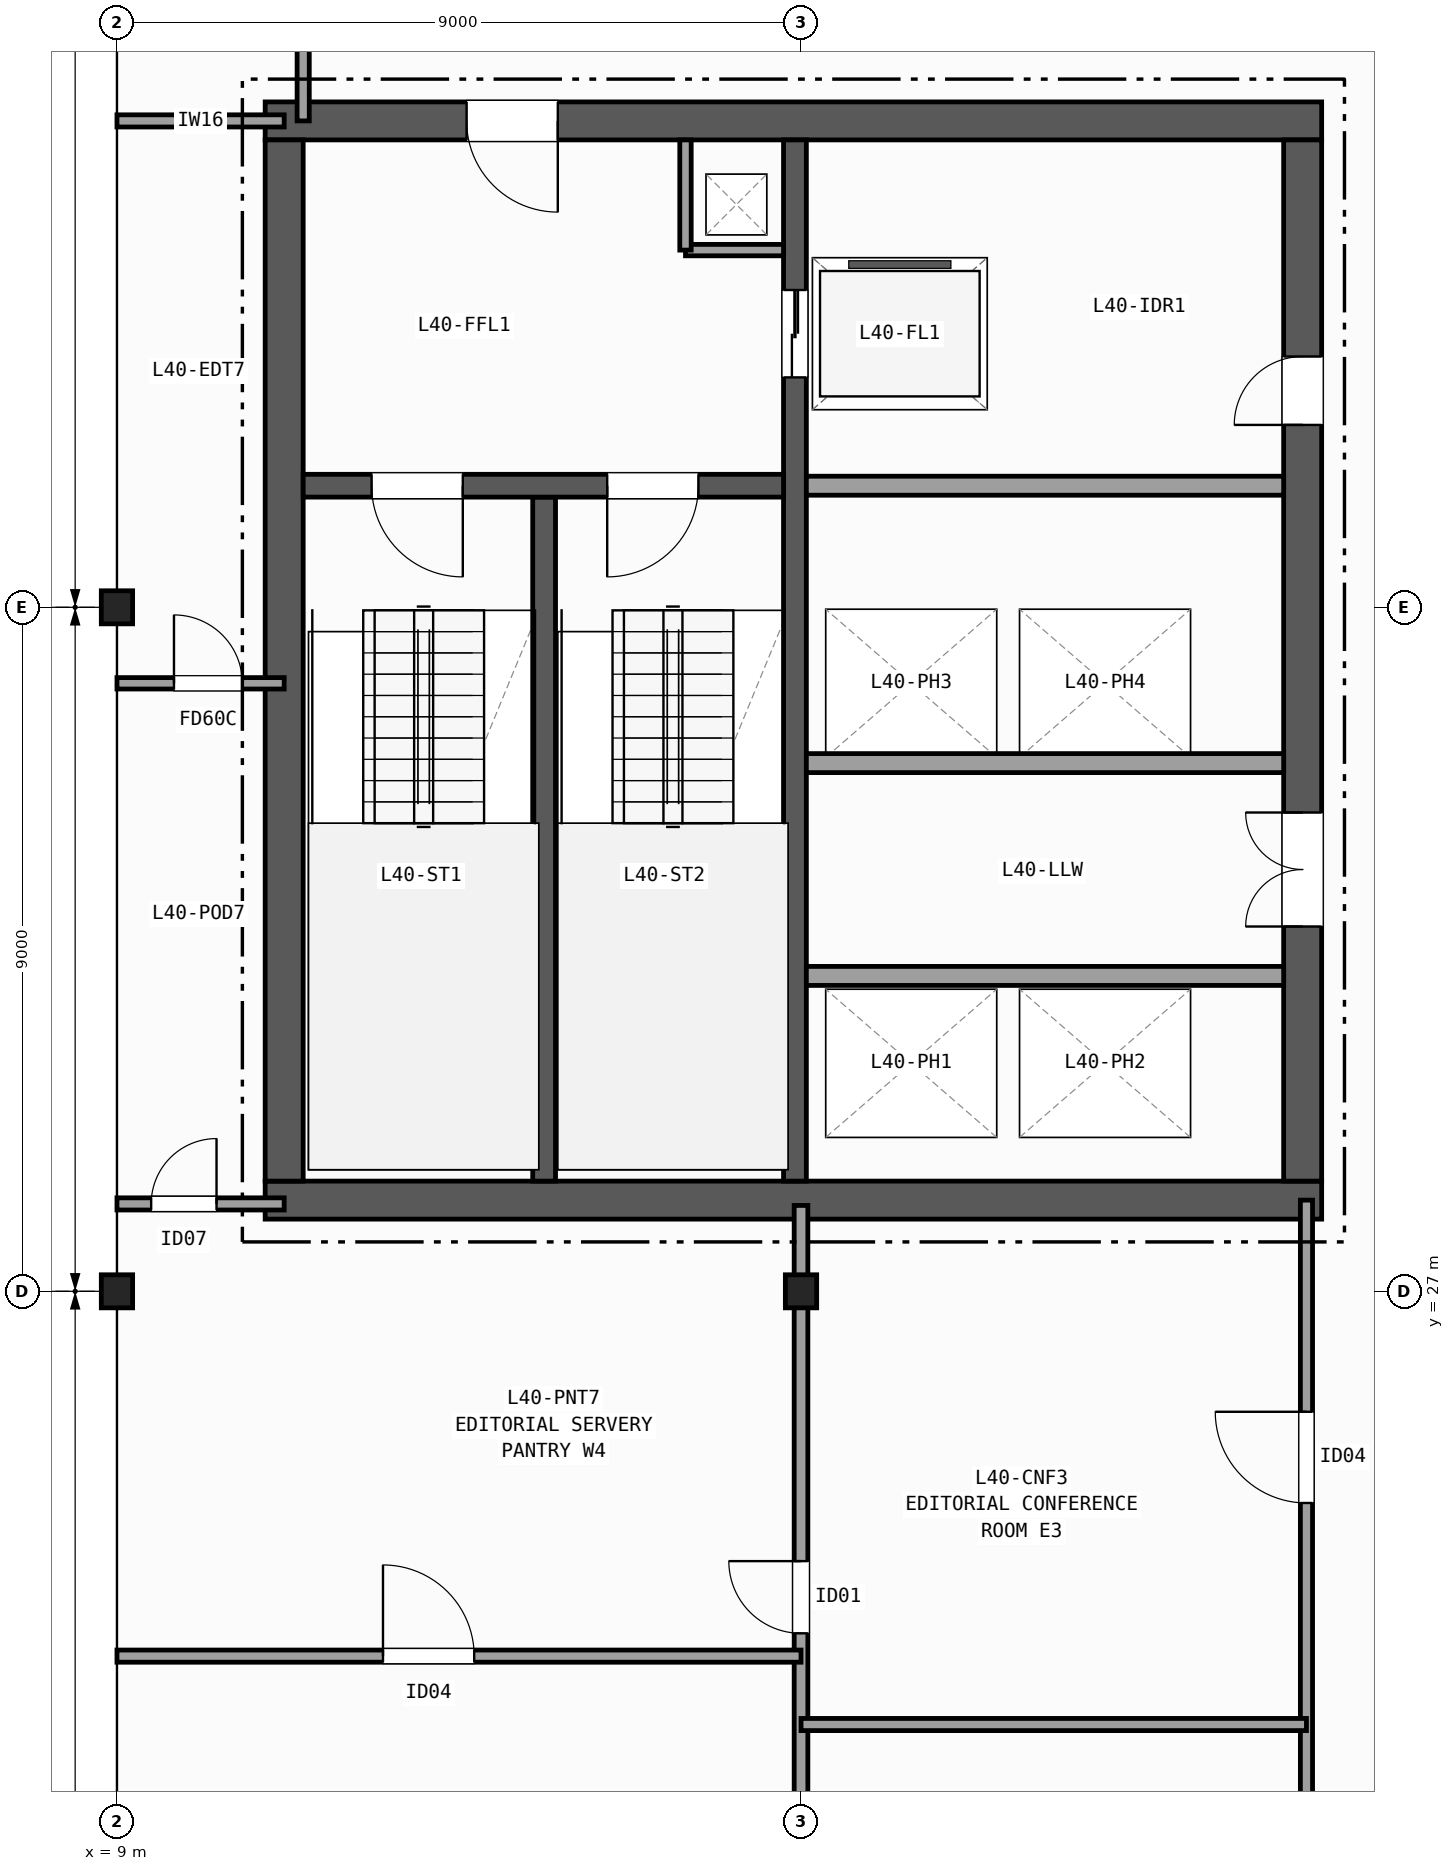
"""IFC4 building model, lengths in metres.
Left out: names, types, materials, properties, quantities, classifications, styles, units other than length and angle.
Written with IfcOpenShell. Run it as: python <this file> out.ifc"""

import sys

from ifc_helpers import new_model, si_unit, direction, frame, frame_2d, origin, origin_2d, place, context, subcontext, project, spatial, rectangle, i_section, extrude, element, fill, save


model = new_model("IFC4")
c1 = context("Model", 3, precision=1e-05, world=origin(), true_north=direction((0.0, 1.0)))
c2 = subcontext(c1, "Body", "Model", "MODEL_VIEW")
j1 = project(units=[si_unit("LENGTHUNIT", "METRE"), si_unit("PLANEANGLEUNIT", "RADIAN")], contexts=[c1])
p1 = place(None, origin())
s1 = spatial("IfcSite", under=j1, at=p1, CompositionType="ELEMENT")
p2 = place(p1, origin())
s2 = spatial("IfcBuilding", under=s1, at=p2, CompositionType="ELEMENT")
p3 = place(p2, frame((0.0, 0.0, 161.8)))
s3 = spatial("IfcBuildingStorey", under=s2, at=p3, CompositionType="ELEMENT", Elevation=161.8)
for number, where, z_axis, x_axis in (
    (1, (9.0, 27.0, 0.0), (0.0, 0.0, 1.0), (1.0, 0.0, 0.0)),
    (2, (9.0, 36.0, 0.0), (0.0, 0.0, 1.0), (1.0, 0.0, 0.0)),
    (3, (18.0, 27.0, 0.0), (0.0, 0.0, 1.0), (1.0, 0.0, 0.0)),
):
    element("IfcColumn", number, at=place(p3, frame(where, z_axis=z_axis, x_axis=x_axis)), inside=s3, PredefinedType="COLUMN", context=c2, shape_type="SweptSolid", body=[
        extrude(i_section(OverallWidth=0.412, OverallDepth=0.435, WebThickness=0.036, FlangeThickness=0.057, FilletRadius=0.015, at=origin_2d()), origin(), (0.0, 0.0, 1.0), 3.7),
    ])
p4 = place(p3, frame((10.95, 28.2, 0.0), z_axis=(0.0, 0.0, 1.0), x_axis=(1.0, 0.0, 0.0)))
e4 = element("IfcWall", 4, at=p4, inside=s3, PredefinedType="SHEAR", context=c2, shape_type="SweptSolid", body=[
    extrude(rectangle(XDim=13.9, YDim=0.5, at=frame_2d((6.95, 0.0))), origin(), (0.0, 0.0, 1.0), 3.42),
])
p5 = place(p3, frame((24.85, 42.4, 0.0), z_axis=(0.0, 0.0, 1.0), x_axis=(-1.0, 0.0, 0.0)))
e5 = element("IfcWall", 5, at=p5, inside=s3, PredefinedType="SHEAR", context=c2, shape_type="SweptSolid", body=[
    extrude(rectangle(XDim=13.9, YDim=0.5, at=frame_2d((6.95, 0.0))), origin(), (0.0, 0.0, 1.0), 3.42),
])
p6 = place(p5, frame((10.05, 0.0, 0.0)))
e6 = element("IfcOpeningElement", 6, at=p6, cuts=e5, PredefinedType="OPENING", context=c2, shape_type="SweptSolid", body=[
    extrude(rectangle(XDim=1.2, YDim=2.15, at=frame_2d((0.6, 1.075))), frame((0.0, 0.26, 0.0), z_axis=(0.0, -1.0, 0.0), x_axis=(1.0, 0.0, 0.0)), (0.0, 0.0, 1.0), 0.52),
])
p7 = place(p3, frame((11.2, 42.15, 0.0), z_axis=(0.0, 0.0, 1.0), x_axis=(0.0, -1.0, 0.0)))
e7 = element("IfcWall", 7, at=p7, inside=s3, PredefinedType="SHEAR", context=c2, shape_type="SweptSolid", body=[
    extrude(rectangle(XDim=13.7, YDim=0.5, at=frame_2d((6.85, 0.0))), origin(), (0.0, 0.0, 1.0), 3.42),
])
p8 = place(p3, frame((24.6, 28.45, 0.0), z_axis=(0.0, 0.0, 1.0), x_axis=(0.0, 1.0, 0.0)))
e8 = element("IfcWall", 8, at=p8, inside=s3, PredefinedType="SHEAR", context=c2, shape_type="SweptSolid", body=[
    extrude(rectangle(XDim=13.7, YDim=0.5, at=frame_2d((6.85, 0.0))), origin(), (0.0, 0.0, 1.0), 3.42),
])
p9 = place(p8, frame((3.35, 0.0, 0.0)))
e9 = element("IfcOpeningElement", 9, at=p9, cuts=e8, PredefinedType="OPENING", context=c2, shape_type="SweptSolid", body=[
    extrude(rectangle(XDim=1.5, YDim=2.2, at=frame_2d((0.75, 1.1))), frame((0.0, 0.26, 0.0), z_axis=(0.0, -1.0, 0.0), x_axis=(1.0, 0.0, 0.0)), (0.0, 0.0, 1.0), 0.52),
])
p10 = place(p8, frame((9.95, 0.0, 0.0)))
e10 = element("IfcOpeningElement", 10, at=p10, cuts=e8, PredefinedType="OPENING", context=c2, shape_type="SweptSolid", body=[
    extrude(rectangle(XDim=0.9, YDim=2.1, at=frame_2d((0.45, 1.05))), frame((0.0, 0.26, 0.0), z_axis=(0.0, -1.0, 0.0), x_axis=(1.0, 0.0, 0.0)), (0.0, 0.0, 1.0), 0.52),
])
p11 = place(p3, frame((14.62, 28.45, 0.0), z_axis=(0.0, 0.0, 1.0), x_axis=(0.0, 1.0, 0.0)))
e11 = element("IfcWall", 11, at=p11, inside=s3, PredefinedType="SHEAR", context=c2, shape_type="SweptSolid", body=[
    extrude(rectangle(XDim=9.0, YDim=0.3, at=frame_2d((4.5, 0.0))), origin(), (0.0, 0.0, 1.0), 3.42),
])
p12 = place(p3, frame((17.92, 42.15, 0.0), z_axis=(0.0, 0.0, 1.0), x_axis=(0.0, -1.0, 0.0)))
e12 = element("IfcWall", 12, at=p12, inside=s3, PredefinedType="SHEAR", context=c2, shape_type="SweptSolid", body=[
    extrude(rectangle(XDim=13.7, YDim=0.3, at=frame_2d((6.85, 0.0))), origin(), (0.0, 0.0, 1.0), 3.42),
])
p13 = place(p12, frame((1.975, 0.0, 0.0)))
e13 = element("IfcOpeningElement", 13, at=p13, cuts=e12, PredefinedType="OPENING", context=c2, shape_type="SweptSolid", body=[
    extrude(rectangle(XDim=1.15, YDim=2.15, at=frame_2d((0.575, 1.075))), frame((0.0, 0.16, 0.0), z_axis=(0.0, -1.0, 0.0), x_axis=(1.0, 0.0, 0.0)), (0.0, 0.0, 1.0), 0.32),
])
p14 = place(p3, frame((17.77, 37.6, 0.0), z_axis=(0.0, 0.0, 1.0), x_axis=(-1.0, 0.0, 0.0)))
e14 = element("IfcWall", 14, at=p14, inside=s3, PredefinedType="SHEAR", context=c2, shape_type="SweptSolid", body=[
    extrude(rectangle(XDim=6.32, YDim=0.3, at=frame_2d((3.16, 0.0))), origin(), (0.0, 0.0, 1.0), 3.42),
])
p15 = place(p14, frame((4.22, 0.0, 0.0)))
e15 = element("IfcOpeningElement", 15, at=p15, cuts=e14, PredefinedType="OPENING", context=c2, shape_type="SweptSolid", body=[
    extrude(rectangle(XDim=1.2, YDim=2.15, at=frame_2d((0.6, 1.075))), frame((0.0, 0.16, 0.0), z_axis=(0.0, -1.0, 0.0), x_axis=(1.0, 0.0, 0.0)), (0.0, 0.0, 1.0), 0.32),
])
p16 = place(p14, frame((1.12, 0.0, 0.0)))
e16 = element("IfcOpeningElement", 16, at=p16, cuts=e14, PredefinedType="OPENING", context=c2, shape_type="SweptSolid", body=[
    extrude(rectangle(XDim=1.2, YDim=2.15, at=frame_2d((0.6, 1.075))), frame((0.0, 0.16, 0.0), z_axis=(0.0, -1.0, 0.0), x_axis=(1.0, 0.0, 0.0)), (0.0, 0.0, 1.0), 0.32),
])
p17 = place(p3, frame((16.48, 40.7, 0.0), z_axis=(0.0, 0.0, 1.0), x_axis=(1.0, 0.0, 0.0)))
e17 = element("IfcWall", 17, at=p17, inside=s3, PredefinedType="PARTITIONING", context=c2, shape_type="SweptSolid", body=[
    extrude(rectangle(XDim=1.29, YDim=0.15, at=frame_2d((0.645, 0.0))), origin(), (0.0, 0.0, 1.0), 3.42),
])
p18 = place(p3, frame((16.48, 40.7, 0.0), z_axis=(0.0, 0.0, 1.0), x_axis=(0.0, 1.0, 0.0)))
e18 = element("IfcWall", 18, at=p18, inside=s3, PredefinedType="PARTITIONING", context=c2, shape_type="SweptSolid", body=[
    extrude(rectangle(XDim=1.45, YDim=0.15, at=frame_2d((0.725, 0.0))), origin(), (0.0, 0.0, 1.0), 3.42),
])
for number, where, z_axis, x_axis in (
    (19, (18.07, 37.6, 0.0), (0.0, 0.0, 1.0), (1.0, 0.0, 0.0)),
    (20, (18.07, 31.15, 0.0), (0.0, 0.0, 1.0), (1.0, 0.0, 0.0)),
    (21, (24.35, 33.95, 0.0), (0.0, 0.0, 1.0), (-1.0, 0.0, 0.0)),
):
    element("IfcWall", number, at=place(p3, frame(where, z_axis=z_axis, x_axis=x_axis)), inside=s3, PredefinedType="PARTITIONING", context=c2, shape_type="SweptSolid", body=[
        extrude(rectangle(XDim=6.28, YDim=0.25, at=frame_2d((3.14, 0.0))), origin(), (0.0, 0.0, 1.0), 3.42),
    ])
p19 = place(p3, frame((9.0, 28.15, 0.0), z_axis=(0.0, 0.0, 1.0), x_axis=(1.0, 0.0, 0.0)))
e22 = element("IfcWall", 22, at=p19, inside=s3, PredefinedType="PARTITIONING", context=c2, shape_type="SweptSolid", body=[
    extrude(rectangle(XDim=2.2, YDim=0.16, at=frame_2d((1.1, 0.0))), origin(), (0.0, 0.0, 1.0), 2.634),
])
p20 = place(p19, frame((0.45, 0.0, 0.0)))
e23 = element("IfcOpeningElement", 23, at=p20, cuts=e22, PredefinedType="OPENING", context=c2, shape_type="SweptSolid", body=[
    extrude(rectangle(XDim=0.86, YDim=2.05, at=frame_2d((0.43, 1.025))), frame((0.0, 0.09, 0.0), z_axis=(0.0, -1.0, 0.0), x_axis=(1.0, 0.0, 0.0)), (0.0, 0.0, 1.0), 0.18),
])
p21 = place(p3, frame((9.0, 42.4, 0.0), z_axis=(0.0, 0.0, 1.0), x_axis=(1.0, 0.0, 0.0)))
e24 = element("IfcWall", 24, at=p21, inside=s3, PredefinedType="PARTITIONING", context=c2, shape_type="SweptSolid", body=[
    extrude(rectangle(XDim=2.2, YDim=0.16, at=frame_2d((1.1, 0.0))), origin(), (0.0, 0.0, 1.0), 2.634),
])
p22 = place(p3, frame((11.45, 42.4, 0.0), z_axis=(0.0, 0.0, 1.0), x_axis=(0.0, 1.0, 0.0)))
e25 = element("IfcWall", 25, at=p22, inside=s3, PredefinedType="PARTITIONING", context=c2, shape_type="SweptSolid", body=[
    extrude(rectangle(XDim=2.1, YDim=0.16, at=frame_2d((1.05, 0.0))), origin(), (0.0, 0.0, 1.0), 3.42),
])
p23 = place(p3, frame((9.0, 35.0, 0.0), z_axis=(0.0, 0.0, 1.0), x_axis=(1.0, 0.0, 0.0)))
e26 = element("IfcWall", 26, at=p23, inside=s3, PredefinedType="PARTITIONING", context=c2, shape_type="SweptSolid", body=[
    extrude(rectangle(XDim=2.2, YDim=0.15, at=frame_2d((1.1, 0.0))), origin(), (0.0, 0.0, 1.0), 2.634),
])
p24 = place(p23, frame((0.75, 0.0, 0.0)))
e27 = element("IfcOpeningElement", 27, at=p24, cuts=e26, PredefinedType="OPENING", context=c2, shape_type="SweptSolid", body=[
    extrude(rectangle(XDim=0.9, YDim=2.1, at=frame_2d((0.45, 1.05))), frame((0.0, 0.085, 0.0), z_axis=(0.0, -1.0, 0.0), x_axis=(1.0, 0.0, 0.0)), (0.0, 0.0, 1.0), 0.17),
])
p25 = place(p3, frame((24.65, 9.0, 0.0), z_axis=(0.0, 0.0, 1.0), x_axis=(0.0, 1.0, 0.0)))
e28 = element("IfcWall", 28, at=p25, inside=s3, PredefinedType="PARTITIONING", context=c2, shape_type="SweptSolid", body=[
    extrude(rectangle(XDim=19.2, YDim=0.16, at=frame_2d((9.6, 0.0))), origin(), (0.0, 0.0, 1.0), 2.634),
])
p26 = place(p25, frame((2.4, 0.0, 0.0)))
e29 = element("IfcOpeningElement", 29, at=p26, cuts=e28, PredefinedType="OPENING", context=c2, shape_type="SweptSolid", body=[
    extrude(rectangle(XDim=1.0, YDim=2.1, at=frame_2d((0.5, 1.05))), frame((0.0, 0.09, 0.0), z_axis=(0.0, -1.0, 0.0), x_axis=(1.0, 0.0, 0.0)), (0.0, 0.0, 1.0), 0.18),
])
p27 = place(p25, frame((8.55, 0.0, 0.0)))
e30 = element("IfcOpeningElement", 30, at=p27, cuts=e28, PredefinedType="OPENING", context=c2, shape_type="SweptSolid", body=[
    extrude(rectangle(XDim=1.05, YDim=2.15, at=frame_2d((0.525, 1.075))), frame((0.0, 0.09, 0.0), z_axis=(0.0, -1.0, 0.0), x_axis=(1.0, 0.0, 0.0)), (0.0, 0.0, 1.0), 0.18),
])
p28 = place(p25, frame((15.215, 0.0, 0.0)))
e31 = element("IfcOpeningElement", 31, at=p28, cuts=e28, PredefinedType="OPENING", context=c2, shape_type="SweptSolid", body=[
    extrude(rectangle(XDim=1.2, YDim=2.15, at=frame_2d((0.6, 1.075))), frame((0.0, 0.09, 0.0), z_axis=(0.0, -1.0, 0.0), x_axis=(1.0, 0.0, 0.0)), (0.0, 0.0, 1.0), 0.18),
])
p29 = place(p3, frame((18.0, 9.0, 0.0), z_axis=(0.0, 0.0, 1.0), x_axis=(0.0, 1.0, 0.0)))
e32 = element("IfcWall", 32, at=p29, inside=s3, PredefinedType="PARTITIONING", context=c2, shape_type="SweptSolid", body=[
    extrude(rectangle(XDim=19.13, YDim=0.18, at=frame_2d((9.565, 0.0))), origin(), (0.0, 0.0, 1.0), 2.634),
])
p30 = place(p29, frame((2.2, 0.0, 0.0)))
e33 = element("IfcOpeningElement", 33, at=p30, cuts=e32, PredefinedType="OPENING", context=c2, shape_type="SweptSolid", body=[
    extrude(rectangle(XDim=0.86, YDim=2.05, at=frame_2d((0.43, 1.025))), frame((0.0, 0.1, 0.0), z_axis=(0.0, -1.0, 0.0), x_axis=(1.0, 0.0, 0.0)), (0.0, 0.0, 1.0), 0.2),
])
p31 = place(p29, frame((13.5, 0.0, 0.0)))
e34 = element("IfcOpeningElement", 34, at=p31, cuts=e32, PredefinedType="OPENING", context=c2, shape_type="SweptSolid", body=[
    extrude(rectangle(XDim=0.95, YDim=2.1, at=frame_2d((0.475, 1.05))), frame((0.0, 0.1, 0.0), z_axis=(0.0, -1.0, 0.0), x_axis=(1.0, 0.0, 0.0)), (0.0, 0.0, 1.0), 0.2),
])
p32 = place(p3, frame((18.0, 21.3, 0.0), z_axis=(0.0, 0.0, 1.0), x_axis=(1.0, 0.0, 0.0)))
e35 = element("IfcWall", 35, at=p32, inside=s3, PredefinedType="PARTITIONING", context=c2, shape_type="SweptSolid", body=[
    extrude(rectangle(XDim=6.65, YDim=0.16, at=frame_2d((3.325, 0.0))), origin(), (0.0, 0.0, 1.0), 2.792),
])
p33 = place(p3, frame((9.0, 22.2, 0.0), z_axis=(0.0, 0.0, 1.0), x_axis=(1.0, 0.0, 0.0)))
e36 = element("IfcWall", 36, at=p33, inside=s3, PredefinedType="PARTITIONING", context=c2, shape_type="SweptSolid", body=[
    extrude(rectangle(XDim=9.0, YDim=0.16, at=frame_2d((4.5, 0.0))), origin(), (0.0, 0.0, 1.0), 2.634),
])
p34 = place(p33, frame((3.5, 0.0, 0.0)))
e37 = element("IfcOpeningElement", 37, at=p34, cuts=e36, PredefinedType="OPENING", context=c2, shape_type="SweptSolid", body=[
    extrude(rectangle(XDim=1.2, YDim=2.15, at=frame_2d((0.6, 1.075))), frame((0.0, 0.09, 0.0), z_axis=(0.0, -1.0, 0.0), x_axis=(1.0, 0.0, 0.0)), (0.0, 0.0, 1.0), 0.18),
])
p35 = place(p15, origin())
e38 = element("IfcDoor", 38, at=p35, inside=s3, OperationType="SINGLE_SWING_LEFT", PredefinedType="DOOR", context=c2, shape_type="SweptSolid", body=[
    extrude(rectangle(XDim=1.2, YDim=2.15, at=frame_2d((0.6, 1.075))), frame((0.0, 0.025, 0.0), z_axis=(0.0, -1.0, 0.0), x_axis=(1.0, 0.0, 0.0)), (0.0, 0.0, 1.0), 0.05),
])
fill(e15, e38)
p36 = place(p16, origin())
e39 = element("IfcDoor", 39, at=p36, inside=s3, OperationType="SINGLE_SWING_RIGHT", PredefinedType="DOOR", context=c2, shape_type="SweptSolid", body=[
    extrude(rectangle(XDim=1.2, YDim=2.15, at=frame_2d((0.6, 1.075))), frame((0.0, 0.025, 0.0), z_axis=(0.0, -1.0, 0.0), x_axis=(1.0, 0.0, 0.0)), (0.0, 0.0, 1.0), 0.05),
])
fill(e16, e39)
p37 = place(p9, origin())
e40 = element("IfcDoor", 40, at=p37, inside=s3, OperationType="DOUBLE_DOOR_SINGLE_SWING", PredefinedType="DOOR", context=c2, shape_type="SweptSolid", body=[
    extrude(rectangle(XDim=1.5, YDim=2.2, at=frame_2d((0.75, 1.1))), frame((0.0, 0.025, 0.0), z_axis=(0.0, -1.0, 0.0), x_axis=(1.0, 0.0, 0.0)), (0.0, 0.0, 1.0), 0.05),
])
fill(e9, e40)
p38 = place(p6, origin())
e41 = element("IfcDoor", 41, at=p38, inside=s3, OperationType="SINGLE_SWING_LEFT", PredefinedType="DOOR", context=c2, shape_type="SweptSolid", body=[
    extrude(rectangle(XDim=1.2, YDim=2.15, at=frame_2d((0.6, 1.075))), frame((0.0, 0.025, 0.0), z_axis=(0.0, -1.0, 0.0), x_axis=(1.0, 0.0, 0.0)), (0.0, 0.0, 1.0), 0.05),
])
fill(e6, e41)
p39 = place(p10, origin())
e42 = element("IfcDoor", 42, at=p39, inside=s3, OperationType="SINGLE_SWING_LEFT", PredefinedType="DOOR", context=c2, shape_type="SweptSolid", body=[
    extrude(rectangle(XDim=0.9, YDim=2.1, at=frame_2d((0.45, 1.05))), frame((0.0, 0.025, 0.0), z_axis=(0.0, -1.0, 0.0), x_axis=(1.0, 0.0, 0.0)), (0.0, 0.0, 1.0), 0.05),
])
fill(e10, e42)
p40 = place(p13, origin())
e43 = element("IfcDoor", 43, at=p40, inside=s3, OperationType="DOUBLE_DOOR_SLIDING", PredefinedType="DOOR", context=c2, shape_type="SweptSolid", body=[
    extrude(rectangle(XDim=1.15, YDim=2.15, at=frame_2d((0.575, 1.075))), frame((0.0, 0.025, 0.0), z_axis=(0.0, -1.0, 0.0), x_axis=(1.0, 0.0, 0.0)), (0.0, 0.0, 1.0), 0.05),
])
fill(e13, e43)
p41 = place(p20, origin())
e44 = element("IfcDoor", 44, at=p41, inside=s3, OperationType="SINGLE_SWING_RIGHT", PredefinedType="DOOR", context=c2, shape_type="SweptSolid", body=[
    extrude(rectangle(XDim=0.86, YDim=2.05, at=frame_2d((0.43, 1.025))), frame((0.0, 0.025, 0.0), z_axis=(0.0, -1.0, 0.0), x_axis=(1.0, 0.0, 0.0)), (0.0, 0.0, 1.0), 0.05),
])
fill(e23, e44)
p42 = place(p24, origin())
e45 = element("IfcDoor", 45, at=p42, inside=s3, OperationType="SINGLE_SWING_LEFT", PredefinedType="DOOR", context=c2, shape_type="SweptSolid", body=[
    extrude(rectangle(XDim=0.9, YDim=2.1, at=frame_2d((0.45, 1.05))), frame((0.0, 0.025, 0.0), z_axis=(0.0, -1.0, 0.0), x_axis=(1.0, 0.0, 0.0)), (0.0, 0.0, 1.0), 0.05),
])
fill(e27, e45)
p43 = place(p28, origin())
e46 = element("IfcDoor", 46, at=p43, inside=s3, OperationType="SINGLE_SWING_RIGHT", PredefinedType="DOOR", context=c2, shape_type="SweptSolid", body=[
    extrude(rectangle(XDim=1.2, YDim=2.15, at=frame_2d((0.6, 1.075))), frame((0.0, 0.025, 0.0), z_axis=(0.0, -1.0, 0.0), x_axis=(1.0, 0.0, 0.0)), (0.0, 0.0, 1.0), 0.05),
])
fill(e31, e46)
p44 = place(p31, origin())
e47 = element("IfcDoor", 47, at=p44, inside=s3, OperationType="SINGLE_SWING_RIGHT", PredefinedType="DOOR", context=c2, shape_type="SweptSolid", body=[
    extrude(rectangle(XDim=0.95, YDim=2.1, at=frame_2d((0.475, 1.05))), frame((0.0, 0.025, 0.0), z_axis=(0.0, -1.0, 0.0), x_axis=(1.0, 0.0, 0.0)), (0.0, 0.0, 1.0), 0.05),
])
fill(e34, e47)
p45 = place(p34, origin())
e48 = element("IfcDoor", 48, at=p45, inside=s3, OperationType="SINGLE_SWING_LEFT", PredefinedType="DOOR", context=c2, shape_type="SweptSolid", body=[
    extrude(rectangle(XDim=1.2, YDim=2.15, at=frame_2d((0.6, 1.075))), frame((0.0, 0.025, 0.0), z_axis=(0.0, -1.0, 0.0), x_axis=(1.0, 0.0, 0.0)), (0.0, 0.0, 1.0), 0.05),
])
fill(e37, e48)
save(model, sys.argv[1])
